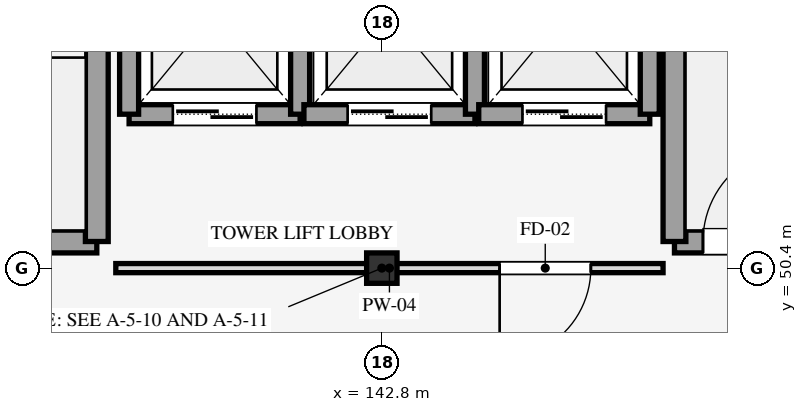
"""IFC4 building model, lengths in metres.
Left out: names, types, materials, properties, quantities, classifications, styles, units other than length and angle.
Written with IfcOpenShell. Run it as: python <this file> out.ifc"""

import sys

from ifc_helpers import new_model, si_unit, direction, frame, frame_2d, origin, origin_2d, place, context, subcontext, project, spatial, rectangle, i_section, extrude, element, fill, save


model = new_model("IFC4")
c1 = context("Model", 3, precision=1e-05, world=origin(), true_north=direction((0.0, 1.0)))
c2 = subcontext(c1, "Body", "Model", "MODEL_VIEW")
j1 = project(units=[si_unit("LENGTHUNIT", "METRE"), si_unit("PLANEANGLEUNIT", "RADIAN")], contexts=[c1])
p1 = place(None, origin())
s1 = spatial("IfcSite", under=j1, at=p1, CompositionType="ELEMENT")
p2 = place(p1, origin())
s2 = spatial("IfcBuilding", under=s1, at=p2, CompositionType="ELEMENT")
p3 = place(p2, frame((0.0, 0.0, 23.4)))
s3 = spatial("IfcBuildingStorey", under=s2, at=p3, CompositionType="ELEMENT", Elevation=23.4)
p4 = place(p3, frame((142.8, 50.4, 0.0), z_axis=(0.0, 0.0, 1.0), x_axis=(1.0, 0.0, 0.0)))
e1 = element("IfcColumn", 1, at=p4, inside=s3, PredefinedType="COLUMN", context=c2, shape_type="SweptSolid", body=[
    extrude(i_section(OverallWidth=0.4, OverallDepth=0.4, WebThickness=0.013, FlangeThickness=0.021, FilletRadius=0.022, at=origin_2d()), origin(), (0.0, 0.0, 1.0), 4.5),
])
p5 = place(p3, frame((135.05, 50.75, 0.0), z_axis=(0.0, 0.0, 1.0), x_axis=(1.0, 0.0, 0.0)))
e2 = element("IfcWall", 2, at=p5, inside=s3, PredefinedType="SHEAR", context=c2, shape_type="SweptSolid", body=[
    extrude(rectangle(XDim=4.0, YDim=0.3, at=frame_2d((2.0, 0.0))), origin(), (0.0, 0.0, 1.0), 4.5),
])
p6 = place(p5, frame((0.375, 0.0, 0.0)))
e3 = element("IfcOpeningElement", 3, at=p6, cuts=e2, PredefinedType="OPENING", context=c2, shape_type="SweptSolid", body=[
    extrude(rectangle(XDim=1.25, YDim=2.15, at=frame_2d((0.625, 1.075))), frame((0.0, 0.16, 0.0), z_axis=(0.0, -1.0, 0.0), x_axis=(1.0, 0.0, 0.0)), (0.0, 0.0, 1.0), 0.32),
])
p7 = place(p3, frame((139.05, 50.75, 0.0), z_axis=(0.0, 0.0, 1.0), x_axis=(0.0, 1.0, 0.0)))
e4 = element("IfcWall", 4, at=p7, inside=s3, PredefinedType="SHEAR", context=c2, shape_type="SweptSolid", body=[
    extrude(rectangle(XDim=14.3, YDim=0.3, at=frame_2d((7.15, 0.0))), origin(), (0.0, 0.0, 1.0), 4.5),
])
p8 = place(p3, frame((146.65, 50.75, 0.0), z_axis=(0.0, 0.0, 1.0), x_axis=(1.0, 0.0, 0.0)))
e5 = element("IfcWall", 5, at=p8, inside=s3, PredefinedType="SHEAR", context=c2, shape_type="SweptSolid", body=[
    extrude(rectangle(XDim=4.0, YDim=0.3, at=frame_2d((2.0, 0.0))), origin(), (0.0, 0.0, 1.0), 4.5),
])
p9 = place(p8, frame((0.375, 0.0, 0.0)))
e6 = element("IfcOpeningElement", 6, at=p9, cuts=e5, PredefinedType="OPENING", context=c2, shape_type="SweptSolid", body=[
    extrude(rectangle(XDim=1.25, YDim=2.15, at=frame_2d((0.625, 1.075))), frame((0.0, 0.16, 0.0), z_axis=(0.0, -1.0, 0.0), x_axis=(1.0, 0.0, 0.0)), (0.0, 0.0, 1.0), 0.32),
])
p10 = place(p3, frame((146.65, 50.75, 0.0), z_axis=(0.0, 0.0, 1.0), x_axis=(0.0, 1.0, 0.0)))
e7 = element("IfcWall", 7, at=p10, inside=s3, PredefinedType="SHEAR", context=c2, shape_type="SweptSolid", body=[
    extrude(rectangle(XDim=14.3, YDim=0.3, at=frame_2d((7.15, 0.0))), origin(), (0.0, 0.0, 1.0), 4.5),
])
p11 = place(p3, frame((139.475, 52.425, 0.0), z_axis=(0.0, 0.0, 1.0), x_axis=(1.0, 0.0, 0.0)))
e8 = element("IfcWall", 8, at=p11, inside=s3, PredefinedType="SHEAR", context=c2, shape_type="SweptSolid", body=[
    extrude(rectangle(XDim=2.25, YDim=0.25, at=frame_2d((1.125, 0.0))), origin(), (0.0, 0.0, 1.0), 4.26),
])
p12 = place(p11, frame((0.575, 0.0, 0.0)))
e9 = element("IfcOpeningElement", 9, at=p12, cuts=e8, PredefinedType="OPENING", context=c2, shape_type="SweptSolid", body=[
    extrude(rectangle(XDim=1.1, YDim=2.15, at=frame_2d((0.55, 1.075))), frame((0.0, 0.135, 0.0), z_axis=(0.0, -1.0, 0.0), x_axis=(1.0, 0.0, 0.0)), (0.0, 0.0, 1.0), 0.27),
])
for number, where, z_axis, x_axis in (
    (10, (139.475, 52.425, 0.0), (0.0, 0.0, 1.0), (0.0, 1.0, 0.0)),
    (11, (141.725, 52.425, 0.0), (0.0, 0.0, 1.0), (0.0, 1.0, 0.0)),
):
    element("IfcWall", number, at=place(p3, frame(where, z_axis=z_axis, x_axis=x_axis)), inside=s3, PredefinedType="SHEAR", context=c2, shape_type="SweptSolid", body=[
        extrude(rectangle(XDim=2.65, YDim=0.25, at=frame_2d((1.325, 0.0))), origin(), (0.0, 0.0, 1.0), 4.26),
    ])
p13 = place(p3, frame((141.775, 52.425, 0.0), z_axis=(0.0, 0.0, 1.0), x_axis=(1.0, 0.0, 0.0)))
e12 = element("IfcWall", 12, at=p13, inside=s3, PredefinedType="SHEAR", context=c2, shape_type="SweptSolid", body=[
    extrude(rectangle(XDim=2.25, YDim=0.25, at=frame_2d((1.125, 0.0))), origin(), (0.0, 0.0, 1.0), 4.26),
])
p14 = place(p13, frame((0.575, 0.0, 0.0)))
e13 = element("IfcOpeningElement", 13, at=p14, cuts=e12, PredefinedType="OPENING", context=c2, shape_type="SweptSolid", body=[
    extrude(rectangle(XDim=1.1, YDim=2.15, at=frame_2d((0.55, 1.075))), frame((0.0, 0.135, 0.0), z_axis=(0.0, -1.0, 0.0), x_axis=(1.0, 0.0, 0.0)), (0.0, 0.0, 1.0), 0.27),
])
p15 = place(p3, frame((144.025, 52.425, 0.0), z_axis=(0.0, 0.0, 1.0), x_axis=(0.0, 1.0, 0.0)))
e14 = element("IfcWall", 14, at=p15, inside=s3, PredefinedType="SHEAR", context=c2, shape_type="SweptSolid", body=[
    extrude(rectangle(XDim=2.65, YDim=0.25, at=frame_2d((1.325, 0.0))), origin(), (0.0, 0.0, 1.0), 4.26),
])
p16 = place(p3, frame((144.075, 52.425, 0.0), z_axis=(0.0, 0.0, 1.0), x_axis=(1.0, 0.0, 0.0)))
e15 = element("IfcWall", 15, at=p16, inside=s3, PredefinedType="SHEAR", context=c2, shape_type="SweptSolid", body=[
    extrude(rectangle(XDim=2.25, YDim=0.25, at=frame_2d((1.125, 0.0))), origin(), (0.0, 0.0, 1.0), 4.26),
])
p17 = place(p16, frame((0.575, 0.0, 0.0)))
e16 = element("IfcOpeningElement", 16, at=p17, cuts=e15, PredefinedType="OPENING", context=c2, shape_type="SweptSolid", body=[
    extrude(rectangle(XDim=1.1, YDim=2.15, at=frame_2d((0.55, 1.075))), frame((0.0, 0.135, 0.0), z_axis=(0.0, -1.0, 0.0), x_axis=(1.0, 0.0, 0.0)), (0.0, 0.0, 1.0), 0.27),
])
p18 = place(p3, frame((146.325, 52.425, 0.0), z_axis=(0.0, 0.0, 1.0), x_axis=(0.0, 1.0, 0.0)))
e17 = element("IfcWall", 17, at=p18, inside=s3, PredefinedType="SHEAR", context=c2, shape_type="SweptSolid", body=[
    extrude(rectangle(XDim=2.65, YDim=0.25, at=frame_2d((1.325, 0.0))), origin(), (0.0, 0.0, 1.0), 4.26),
])
p19 = place(p3, frame((139.3, 50.4, 0.0), z_axis=(0.0, 0.0, 1.0), x_axis=(1.0, 0.0, 0.0)))
e18 = element("IfcWall", 18, at=p19, inside=s3, PredefinedType="PARTITIONING", context=c2, shape_type="SweptSolid", body=[
    extrude(rectangle(XDim=7.2, YDim=0.12, at=frame_2d((3.6, 0.0))), origin(), (0.0, 0.0, 1.0), 3.54),
])
p20 = place(p19, frame((5.05, 0.0, 0.0)))
e19 = element("IfcOpeningElement", 19, at=p20, cuts=e18, PredefinedType="OPENING", context=c2, shape_type="SweptSolid", body=[
    extrude(rectangle(XDim=1.2, YDim=2.15, at=frame_2d((0.6, 1.075))), frame((0.0, 0.07, 0.0), z_axis=(0.0, -1.0, 0.0), x_axis=(1.0, 0.0, 0.0)), (0.0, 0.0, 1.0), 0.14),
])
p21 = place(p9, origin())
e20 = element("IfcDoor", 20, at=p21, inside=s3, OperationType="SINGLE_SWING_RIGHT", PredefinedType="DOOR", context=c2, shape_type="SweptSolid", body=[
    extrude(rectangle(XDim=1.25, YDim=2.15, at=frame_2d((0.625, 1.075))), frame((0.0, 0.025, 0.0), z_axis=(0.0, -1.0, 0.0), x_axis=(1.0, 0.0, 0.0)), (0.0, 0.0, 1.0), 0.05),
])
fill(e6, e20)
p22 = place(p12, origin())
e21 = element("IfcDoor", 21, at=p22, inside=s3, OperationType="DOUBLE_DOOR_SLIDING", PredefinedType="DOOR", context=c2, shape_type="SweptSolid", body=[
    extrude(rectangle(XDim=1.1, YDim=2.15, at=frame_2d((0.55, 1.075))), frame((0.0, 0.025, 0.0), z_axis=(0.0, -1.0, 0.0), x_axis=(1.0, 0.0, 0.0)), (0.0, 0.0, 1.0), 0.05),
])
fill(e9, e21)
p23 = place(p14, origin())
e22 = element("IfcDoor", 22, at=p23, inside=s3, OperationType="DOUBLE_DOOR_SLIDING", PredefinedType="DOOR", context=c2, shape_type="SweptSolid", body=[
    extrude(rectangle(XDim=1.1, YDim=2.15, at=frame_2d((0.55, 1.075))), frame((0.0, 0.025, 0.0), z_axis=(0.0, -1.0, 0.0), x_axis=(1.0, 0.0, 0.0)), (0.0, 0.0, 1.0), 0.05),
])
fill(e13, e22)
p24 = place(p17, origin())
e23 = element("IfcDoor", 23, at=p24, inside=s3, OperationType="DOUBLE_DOOR_SLIDING", PredefinedType="DOOR", context=c2, shape_type="SweptSolid", body=[
    extrude(rectangle(XDim=1.1, YDim=2.15, at=frame_2d((0.55, 1.075))), frame((0.0, 0.025, 0.0), z_axis=(0.0, -1.0, 0.0), x_axis=(1.0, 0.0, 0.0)), (0.0, 0.0, 1.0), 0.05),
])
fill(e16, e23)
p25 = place(p20, frame((1.2, 0.0, 0.0), z_axis=(0.0, 0.0, 1.0), x_axis=(-1.0, 0.0, 0.0)))
e24 = element("IfcDoor", 24, at=p25, inside=s3, OperationType="SINGLE_SWING_RIGHT", PredefinedType="DOOR", context=c2, shape_type="SweptSolid", body=[
    extrude(rectangle(XDim=1.2, YDim=2.15, at=frame_2d((0.6, 1.075))), frame((0.0, 0.025, 0.0), z_axis=(0.0, -1.0, 0.0), x_axis=(1.0, 0.0, 0.0)), (0.0, 0.0, 1.0), 0.05),
])
fill(e19, e24)
save(model, sys.argv[1])
